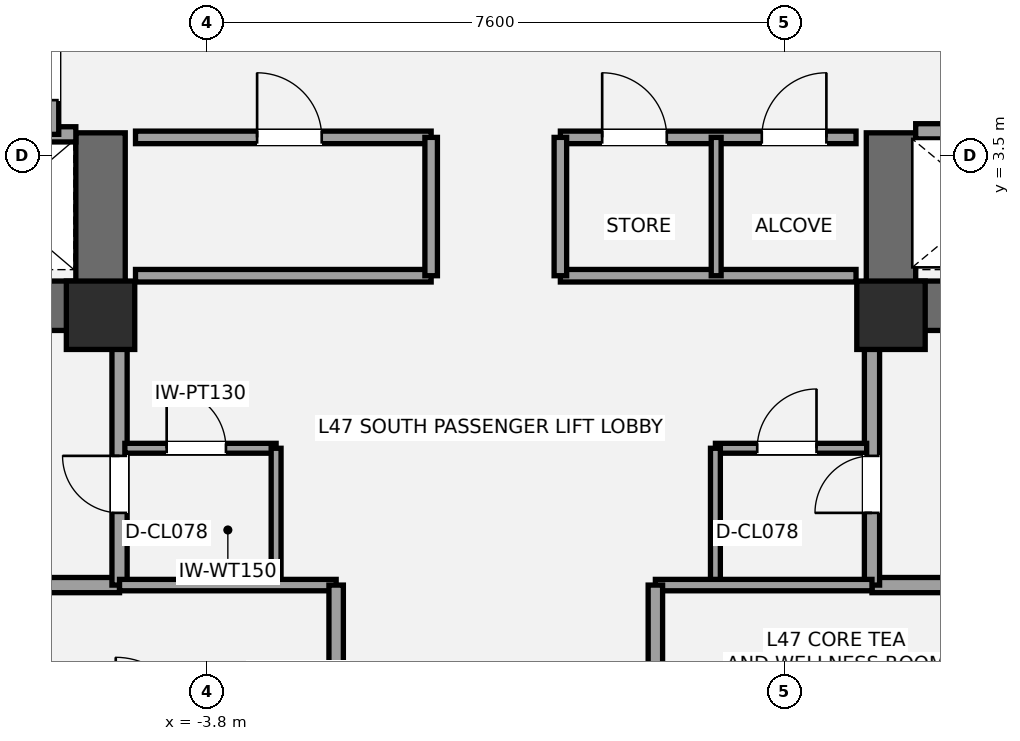
"""IFC4 building model, lengths in metres.
Left out: names, types, materials, properties, quantities, classifications, styles, units other than length and angle.
Written with IfcOpenShell. Run it as: python <this file> out.ifc"""

import sys

from ifc_helpers import new_model, si_unit, direction, frame, frame_2d, origin, origin_2d, place, context, subcontext, project, spatial, rectangle, extrude, element, fill, save


model = new_model("IFC4")
c1 = context("Model", 3, precision=1e-05, world=origin(), true_north=direction((0.0, 1.0)))
c2 = subcontext(c1, "Body", "Model", "MODEL_VIEW")
j1 = project(units=[si_unit("LENGTHUNIT", "METRE"), si_unit("PLANEANGLEUNIT", "RADIAN")], contexts=[c1])
p1 = place(None, origin())
s1 = spatial("IfcSite", under=j1, at=p1, CompositionType="ELEMENT")
p2 = place(p1, origin())
s2 = spatial("IfcBuilding", under=s1, at=p2, CompositionType="ELEMENT")
p3 = place(p2, frame((0.0, 0.0, 172.6)))
s3 = spatial("IfcBuildingStorey", under=s2, at=p3, CompositionType="ELEMENT", Elevation=172.6)
p4 = place(p3, frame((-4.875, 1.525, 0.0), z_axis=(0.0, 0.0, 1.0), x_axis=(-1.0, 0.0, 0.0)))
e1 = element("IfcWall", 1, at=p4, inside=s3, PredefinedType="SHEAR", context=c2, shape_type="SweptSolid", body=[
    extrude(rectangle(XDim=8.925, YDim=0.65, at=frame_2d((4.462, 0.0))), origin(), (0.0, 0.0, 1.0), 3.2),
])
p5 = place(p4, frame((5.425, 0.0, 0.0)))
e2 = element("IfcOpeningElement", 2, at=p5, cuts=e1, PredefinedType="OPENING", context=c2, shape_type="SweptSolid", body=[
    extrude(rectangle(XDim=1.05, YDim=2.15, at=frame_2d((0.525, 1.075))), frame((0.0, 0.335, 0.0), z_axis=(0.0, -1.0, 0.0), x_axis=(1.0, 0.0, 0.0)), (0.0, 0.0, 1.0), 0.67),
])
p6 = place(p4, frame((3.755, 0.0, 0.0)))
e3 = element("IfcOpeningElement", 3, at=p6, cuts=e1, PredefinedType="OPENING", context=c2, shape_type="SweptSolid", body=[
    extrude(rectangle(XDim=1.1, YDim=2.2, at=frame_2d((0.55, 1.1))), frame((0.0, 0.335, 0.0), z_axis=(0.0, -1.0, 0.0), x_axis=(1.0, 0.0, 0.0)), (0.0, 0.0, 1.0), 0.67),
])
p7 = place(p3, frame((-5.2, 1.2, 0.0), z_axis=(0.0, 0.0, 1.0), x_axis=(0.0, 1.0, 0.0)))
e4 = element("IfcWall", 4, at=p7, inside=s3, PredefinedType="SHEAR", context=c2, shape_type="SweptSolid", body=[
    extrude(rectangle(XDim=2.6, YDim=0.65, at=frame_2d((1.3, 0.0))), origin(), (0.0, 0.0, 1.0), 3.2),
])
p8 = place(p3, frame((13.8, 1.525, 0.0), z_axis=(0.0, 0.0, 1.0), x_axis=(-1.0, 0.0, 0.0)))
e5 = element("IfcWall", 5, at=p8, inside=s3, PredefinedType="SHEAR", context=c2, shape_type="SweptSolid", body=[
    extrude(rectangle(XDim=8.925, YDim=0.65, at=frame_2d((4.462, 0.0))), origin(), (0.0, 0.0, 1.0), 3.2),
])
p9 = place(p8, frame((2.45, 0.0, 0.0)))
e6 = element("IfcOpeningElement", 6, at=p9, cuts=e5, PredefinedType="OPENING", context=c2, shape_type="SweptSolid", body=[
    extrude(rectangle(XDim=1.05, YDim=2.15, at=frame_2d((0.525, 1.075))), frame((0.0, 0.335, 0.0), z_axis=(0.0, -1.0, 0.0), x_axis=(1.0, 0.0, 0.0)), (0.0, 0.0, 1.0), 0.67),
])
p10 = place(p8, frame((4.45, 0.0, 0.0)))
e7 = element("IfcOpeningElement", 7, at=p10, cuts=e5, PredefinedType="OPENING", context=c2, shape_type="SweptSolid", body=[
    extrude(rectangle(XDim=1.1, YDim=2.2, at=frame_2d((0.55, 1.1))), frame((0.0, 0.335, 0.0), z_axis=(0.0, -1.0, 0.0), x_axis=(1.0, 0.0, 0.0)), (0.0, 0.0, 1.0), 0.67),
])
p11 = place(p3, frame((5.2, 1.2, 0.0), z_axis=(0.0, 0.0, 1.0), x_axis=(0.0, 1.0, 0.0)))
e8 = element("IfcWall", 8, at=p11, inside=s3, PredefinedType="SHEAR", context=c2, shape_type="SweptSolid", body=[
    extrude(rectangle(XDim=2.6, YDim=0.65, at=frame_2d((1.3, 0.0))), origin(), (0.0, 0.0, 1.0), 3.2),
])
for number, where, z_axis, x_axis in (
    (9, (-5.2, 1.4, 0.0), (0.0, 0.0, 1.0), (1.0, 0.0, 0.0)),
    (10, (5.2, 1.4, 0.0), (0.0, 0.0, 1.0), (1.0, 0.0, 0.0)),
):
    element("IfcColumn", number, at=place(p3, frame(where, z_axis=z_axis, x_axis=x_axis)), inside=s3, PredefinedType="COLUMN", context=c2, shape_type="SweptSolid", body=[
        extrude(rectangle(XDim=0.9, YDim=0.9, at=origin_2d()), origin(), (0.0, 0.0, 1.0), 3.2),
    ])
p12 = place(p3, frame((-7.2, -2.15, 0.0), z_axis=(0.0, 0.0, 1.0), x_axis=(1.0, 0.0, 0.0)))
e11 = element("IfcWall", 11, at=p12, inside=s3, PredefinedType="SOLIDWALL", context=c2, shape_type="SweptSolid", body=[
    extrude(rectangle(XDim=2.25, YDim=0.2, at=frame_2d((1.125, 0.0))), origin(), (0.0, 0.0, 1.0), 3.02),
])
p13 = place(p3, frame((-4.95, -2.15, 0.0), z_axis=(0.0, 0.0, 1.0), x_axis=(0.0, 1.0, 0.0)))
e12 = element("IfcWall", 12, at=p13, inside=s3, PredefinedType="SOLIDWALL", context=c2, shape_type="SweptSolid", body=[
    extrude(rectangle(XDim=3.4, YDim=0.2, at=frame_2d((1.7, 0.0))), origin(), (0.0, 0.0, 1.0), 2.473),
])
p14 = place(p13, frame((0.95, 0.0, 0.0)))
e13 = element("IfcOpeningElement", 13, at=p14, cuts=e12, PredefinedType="OPENING", context=c2, shape_type="SweptSolid", body=[
    extrude(rectangle(XDim=0.75, YDim=2.1, at=frame_2d((0.375, 1.05))), frame((0.0, 0.11, 0.0), z_axis=(0.0, -1.0, 0.0), x_axis=(1.0, 0.0, 0.0)), (0.0, 0.0, 1.0), 0.22),
])
p15 = place(p3, frame((4.95, -2.15, 0.0), z_axis=(0.0, 0.0, 1.0), x_axis=(1.0, 0.0, 0.0)))
e14 = element("IfcWall", 14, at=p15, inside=s3, PredefinedType="SOLIDWALL", context=c2, shape_type="SweptSolid", body=[
    extrude(rectangle(XDim=2.25, YDim=0.2, at=frame_2d((1.125, 0.0))), origin(), (0.0, 0.0, 1.0), 3.02),
])
p16 = place(p3, frame((4.95, -2.15, 0.0), z_axis=(0.0, 0.0, 1.0), x_axis=(0.0, 1.0, 0.0)))
e15 = element("IfcWall", 15, at=p16, inside=s3, PredefinedType="SOLIDWALL", context=c2, shape_type="SweptSolid", body=[
    extrude(rectangle(XDim=3.4, YDim=0.2, at=frame_2d((1.7, 0.0))), origin(), (0.0, 0.0, 1.0), 2.473),
])
p17 = place(p16, frame((0.95, 0.0, 0.0)))
e16 = element("IfcOpeningElement", 16, at=p17, cuts=e15, PredefinedType="OPENING", context=c2, shape_type="SweptSolid", body=[
    extrude(rectangle(XDim=0.75, YDim=2.1, at=frame_2d((0.375, 1.05))), frame((0.0, 0.11, 0.0), z_axis=(0.0, -1.0, 0.0), x_axis=(1.0, 0.0, 0.0)), (0.0, 0.0, 1.0), 0.22),
])
p18 = place(p3, frame((-4.88, -0.35, 0.0), z_axis=(0.0, 0.0, 1.0), x_axis=(1.0, 0.0, 0.0)))
e17 = element("IfcWall", 17, at=p18, inside=s3, PredefinedType="PARTITIONING", context=c2, shape_type="SweptSolid", body=[
    extrude(rectangle(XDim=1.99, YDim=0.13, at=frame_2d((0.995, 0.0))), origin(), (0.0, 0.0, 1.0), 3.02),
])
p19 = place(p18, frame((0.55, 0.0, 0.0)))
e18 = element("IfcOpeningElement", 18, at=p19, cuts=e17, PredefinedType="OPENING", context=c2, shape_type="SweptSolid", body=[
    extrude(rectangle(XDim=0.78, YDim=2.1, at=frame_2d((0.39, 1.05))), frame((0.0, 0.075, 0.0), z_axis=(0.0, -1.0, 0.0), x_axis=(1.0, 0.0, 0.0)), (0.0, 0.0, 1.0), 0.15),
])
p20 = place(p3, frame((-2.89, -2.15, 0.0), z_axis=(0.0, 0.0, 1.0), x_axis=(0.0, 1.0, 0.0)))
e19 = element("IfcWall", 19, at=p20, inside=s3, PredefinedType="PARTITIONING", context=c2, shape_type="SweptSolid", body=[
    extrude(rectangle(XDim=1.8, YDim=0.13, at=frame_2d((0.9, 0.0))), origin(), (0.0, 0.0, 1.0), 3.02),
])
p21 = place(p3, frame((2.89, -0.35, 0.0), z_axis=(0.0, 0.0, 1.0), x_axis=(1.0, 0.0, 0.0)))
e20 = element("IfcWall", 20, at=p21, inside=s3, PredefinedType="PARTITIONING", context=c2, shape_type="SweptSolid", body=[
    extrude(rectangle(XDim=1.99, YDim=0.13, at=frame_2d((0.995, 0.0))), origin(), (0.0, 0.0, 1.0), 3.02),
])
p22 = place(p21, frame((0.55, 0.0, 0.0)))
e21 = element("IfcOpeningElement", 21, at=p22, cuts=e20, PredefinedType="OPENING", context=c2, shape_type="SweptSolid", body=[
    extrude(rectangle(XDim=0.78, YDim=2.1, at=frame_2d((0.39, 1.05))), frame((0.0, 0.075, 0.0), z_axis=(0.0, -1.0, 0.0), x_axis=(1.0, 0.0, 0.0)), (0.0, 0.0, 1.0), 0.15),
])
p23 = place(p3, frame((2.89, -2.15, 0.0), z_axis=(0.0, 0.0, 1.0), x_axis=(0.0, 1.0, 0.0)))
e22 = element("IfcWall", 22, at=p23, inside=s3, PredefinedType="PARTITIONING", context=c2, shape_type="SweptSolid", body=[
    extrude(rectangle(XDim=1.8, YDim=0.13, at=frame_2d((0.9, 0.0))), origin(), (0.0, 0.0, 1.0), 3.02),
])
p24 = place(p3, frame((-9.78, 3.78, 0.0), z_axis=(0.0, 0.0, 1.0), x_axis=(1.0, 0.0, 0.0)))
e23 = element("IfcWall", 23, at=p24, inside=s3, PredefinedType="SOLIDWALL", context=c2, shape_type="SweptSolid", body=[
    extrude(rectangle(XDim=4.255, YDim=0.2, at=frame_2d((2.127, 0.0))), origin(), (0.0, 0.0, 1.0), 3.02),
])
p25 = place(p3, frame((-5.85, 3.78, 0.0), z_axis=(0.0, 0.0, 1.0), x_axis=(0.0, 1.0, 0.0)))
e24 = element("IfcWall", 24, at=p25, inside=s3, PredefinedType="SOLIDWALL", context=c2, shape_type="SweptSolid", body=[
    extrude(rectangle(XDim=1.69, YDim=0.2, at=frame_2d((0.845, 0.0))), origin(), (0.0, 0.0, 1.0), 3.02),
])
p26 = place(p25, frame((0.45, 0.0, 0.0)))
e25 = element("IfcOpeningElement", 25, at=p26, cuts=e24, PredefinedType="OPENING", context=c2, shape_type="SweptSolid", body=[
    extrude(rectangle(XDim=0.75, YDim=2.1, at=frame_2d((0.375, 1.05))), frame((0.0, 0.11, 0.0), z_axis=(0.0, -1.0, 0.0), x_axis=(1.0, 0.0, 0.0)), (0.0, 0.0, 1.0), 0.22),
])
p27 = place(p3, frame((5.525, 3.82, 0.0), z_axis=(0.0, 0.0, 1.0), x_axis=(1.0, 0.0, 0.0)))
e26 = element("IfcWall", 26, at=p27, inside=s3, PredefinedType="SOLIDWALL", context=c2, shape_type="SweptSolid", body=[
    extrude(rectangle(XDim=4.255, YDim=0.2, at=frame_2d((2.127, 0.0))), origin(), (0.0, 0.0, 1.0), 3.02),
])
p28 = place(p27, frame((0.65, 0.0, 0.0)))
e27 = element("IfcOpeningElement", 27, at=p28, cuts=e26, PredefinedType="OPENING", context=c2, shape_type="SweptSolid", body=[
    extrude(rectangle(XDim=1.2, YDim=2.2, at=frame_2d((0.6, 1.1))), frame((0.0, 0.11, 0.0), z_axis=(0.0, -1.0, 0.0), x_axis=(1.0, 0.0, 0.0)), (0.0, 0.0, 1.0), 0.22),
])
p29 = place(p3, frame((-4.74, 1.92, 0.0), z_axis=(0.0, 0.0, 1.0), x_axis=(1.0, 0.0, 0.0)))
e28 = element("IfcWall", 28, at=p29, inside=s3, PredefinedType="PARTITIONING", context=c2, shape_type="SweptSolid", body=[
    extrude(rectangle(XDim=3.89, YDim=0.165, at=frame_2d((1.945, 0.0))), origin(), (0.0, 0.0, 1.0), 2.16),
])
p30 = place(p3, frame((-4.74, 3.74, 0.0), z_axis=(0.0, 0.0, 1.0), x_axis=(1.0, 0.0, 0.0)))
e29 = element("IfcWall", 29, at=p30, inside=s3, PredefinedType="PARTITIONING", context=c2, shape_type="SweptSolid", body=[
    extrude(rectangle(XDim=3.89, YDim=0.165, at=frame_2d((1.945, 0.0))), origin(), (0.0, 0.0, 1.0), 3.02),
])
p31 = place(p30, frame((1.6, 0.0, 0.0)))
e30 = element("IfcOpeningElement", 30, at=p31, cuts=e29, PredefinedType="OPENING", context=c2, shape_type="SweptSolid", body=[
    extrude(rectangle(XDim=0.85, YDim=2.1, at=frame_2d((0.425, 1.05))), frame((0.0, 0.093, 0.0), z_axis=(0.0, -1.0, 0.0), x_axis=(1.0, 0.0, 0.0)), (0.0, 0.0, 1.0), 0.185),
])
p32 = place(p3, frame((-0.85, 1.92, 0.0), z_axis=(0.0, 0.0, 1.0), x_axis=(0.0, 1.0, 0.0)))
e31 = element("IfcWall", 31, at=p32, inside=s3, PredefinedType="PARTITIONING", context=c2, shape_type="SweptSolid", body=[
    extrude(rectangle(XDim=1.82, YDim=0.165, at=frame_2d((0.91, 0.0))), origin(), (0.0, 0.0, 1.0), 3.02),
])
p33 = place(p3, frame((0.85, 1.92, 0.0), z_axis=(0.0, 0.0, 1.0), x_axis=(1.0, 0.0, 0.0)))
e32 = element("IfcWall", 32, at=p33, inside=s3, PredefinedType="PARTITIONING", context=c2, shape_type="SweptSolid", body=[
    extrude(rectangle(XDim=3.89, YDim=0.165, at=frame_2d((1.945, 0.0))), origin(), (0.0, 0.0, 1.0), 2.16),
])
p34 = place(p3, frame((0.85, 3.74, 0.0), z_axis=(0.0, 0.0, 1.0), x_axis=(1.0, 0.0, 0.0)))
e33 = element("IfcWall", 33, at=p34, inside=s3, PredefinedType="PARTITIONING", context=c2, shape_type="SweptSolid", body=[
    extrude(rectangle(XDim=3.89, YDim=0.165, at=frame_2d((1.945, 0.0))), origin(), (0.0, 0.0, 1.0), 3.02),
])
p35 = place(p34, frame((0.55, 0.0, 0.0)))
e34 = element("IfcOpeningElement", 34, at=p35, cuts=e33, PredefinedType="OPENING", context=c2, shape_type="SweptSolid", body=[
    extrude(rectangle(XDim=0.85, YDim=2.1, at=frame_2d((0.425, 1.05))), frame((0.0, 0.093, 0.0), z_axis=(0.0, -1.0, 0.0), x_axis=(1.0, 0.0, 0.0)), (0.0, 0.0, 1.0), 0.185),
])
p36 = place(p34, frame((2.65, 0.0, 0.0)))
e35 = element("IfcOpeningElement", 35, at=p36, cuts=e33, PredefinedType="OPENING", context=c2, shape_type="SweptSolid", body=[
    extrude(rectangle(XDim=0.85, YDim=2.1, at=frame_2d((0.425, 1.05))), frame((0.0, 0.093, 0.0), z_axis=(0.0, -1.0, 0.0), x_axis=(1.0, 0.0, 0.0)), (0.0, 0.0, 1.0), 0.185),
])
p37 = place(p3, frame((0.85, 1.92, 0.0), z_axis=(0.0, 0.0, 1.0), x_axis=(0.0, 1.0, 0.0)))
e36 = element("IfcWall", 36, at=p37, inside=s3, PredefinedType="PARTITIONING", context=c2, shape_type="SweptSolid", body=[
    extrude(rectangle(XDim=1.82, YDim=0.165, at=frame_2d((0.91, 0.0))), origin(), (0.0, 0.0, 1.0), 3.02),
])
p38 = place(p3, frame((2.9, 1.92, 0.0), z_axis=(0.0, 0.0, 1.0), x_axis=(0.0, 1.0, 0.0)))
e37 = element("IfcWall", 37, at=p38, inside=s3, PredefinedType="PARTITIONING", context=c2, shape_type="SweptSolid", body=[
    extrude(rectangle(XDim=1.82, YDim=0.13, at=frame_2d((0.91, 0.0))), origin(), (0.0, 0.0, 1.0), 3.02),
])
p39 = place(p3, frame((-4.95, -2.15, 0.0), z_axis=(0.0, 0.0, 1.0), x_axis=(1.0, 0.0, 0.0)))
e38 = element("IfcWall", 38, at=p39, inside=s3, PredefinedType="PLUMBINGWALL", context=c2, shape_type="SweptSolid", body=[
    extrude(rectangle(XDim=2.85, YDim=0.15, at=frame_2d((1.425, 0.0))), origin(), (0.0, 0.0, 1.0), 3.02),
])
p40 = place(p3, frame((-2.1, -4.05, 0.0), z_axis=(0.0, 0.0, 1.0), x_axis=(0.0, 1.0, 0.0)))
e39 = element("IfcWall", 39, at=p40, inside=s3, PredefinedType="PLUMBINGWALL", context=c2, shape_type="SweptSolid", body=[
    extrude(rectangle(XDim=1.9, YDim=0.19, at=frame_2d((0.95, 0.0))), origin(), (0.0, 0.0, 1.0), 3.02),
])
p41 = place(p3, frame((2.1, -2.15, 0.0), z_axis=(0.0, 0.0, 1.0), x_axis=(1.0, 0.0, 0.0)))
e40 = element("IfcWall", 40, at=p41, inside=s3, PredefinedType="PLUMBINGWALL", context=c2, shape_type="SweptSolid", body=[
    extrude(rectangle(XDim=2.85, YDim=0.15, at=frame_2d((1.425, 0.0))), origin(), (0.0, 0.0, 1.0), 3.02),
])
p42 = place(p3, frame((2.1, -4.05, 0.0), z_axis=(0.0, 0.0, 1.0), x_axis=(0.0, 1.0, 0.0)))
e41 = element("IfcWall", 41, at=p42, inside=s3, PredefinedType="PLUMBINGWALL", context=c2, shape_type="SweptSolid", body=[
    extrude(rectangle(XDim=1.9, YDim=0.19, at=frame_2d((0.95, 0.0))), origin(), (0.0, 0.0, 1.0), 3.02),
])
p43 = place(p14, origin())
e42 = element("IfcDoor", 42, at=p43, inside=s3, OperationType="SINGLE_SWING_RIGHT", PredefinedType="DOOR", context=c2, shape_type="SweptSolid", body=[
    extrude(rectangle(XDim=0.75, YDim=2.1, at=frame_2d((0.375, 1.05))), frame((0.0, 0.025, 0.0), z_axis=(0.0, -1.0, 0.0), x_axis=(1.0, 0.0, 0.0)), (0.0, 0.0, 1.0), 0.05),
])
fill(e13, e42)
p44 = place(p17, origin())
e43 = element("IfcDoor", 43, at=p44, inside=s3, OperationType="SINGLE_SWING_LEFT", PredefinedType="DOOR", context=c2, shape_type="SweptSolid", body=[
    extrude(rectangle(XDim=0.75, YDim=2.1, at=frame_2d((0.375, 1.05))), frame((0.0, 0.025, 0.0), z_axis=(0.0, -1.0, 0.0), x_axis=(1.0, 0.0, 0.0)), (0.0, 0.0, 1.0), 0.05),
])
fill(e16, e43)
p45 = place(p19, origin())
e44 = element("IfcDoor", 44, at=p45, inside=s3, OperationType="SINGLE_SWING_LEFT", PredefinedType="DOOR", context=c2, shape_type="SweptSolid", body=[
    extrude(rectangle(XDim=0.78, YDim=2.1, at=frame_2d((0.39, 1.05))), frame((0.0, 0.025, 0.0), z_axis=(0.0, -1.0, 0.0), x_axis=(1.0, 0.0, 0.0)), (0.0, 0.0, 1.0), 0.05),
])
fill(e18, e44)
p46 = place(p22, origin())
e45 = element("IfcDoor", 45, at=p46, inside=s3, OperationType="SINGLE_SWING_RIGHT", PredefinedType="DOOR", context=c2, shape_type="SweptSolid", body=[
    extrude(rectangle(XDim=0.78, YDim=2.1, at=frame_2d((0.39, 1.05))), frame((0.0, 0.025, 0.0), z_axis=(0.0, -1.0, 0.0), x_axis=(1.0, 0.0, 0.0)), (0.0, 0.0, 1.0), 0.05),
])
fill(e21, e45)
p47 = place(p26, origin())
e46 = element("IfcDoor", 46, at=p47, inside=s3, OperationType="SINGLE_SWING_RIGHT", PredefinedType="DOOR", context=c2, shape_type="SweptSolid", body=[
    extrude(rectangle(XDim=0.75, YDim=2.1, at=frame_2d((0.375, 1.05))), frame((0.0, 0.025, 0.0), z_axis=(0.0, -1.0, 0.0), x_axis=(1.0, 0.0, 0.0)), (0.0, 0.0, 1.0), 0.05),
])
fill(e25, e46)
p48 = place(p31, origin())
e47 = element("IfcDoor", 47, at=p48, inside=s3, OperationType="SINGLE_SWING_LEFT", PredefinedType="DOOR", context=c2, shape_type="SweptSolid", body=[
    extrude(rectangle(XDim=0.85, YDim=2.1, at=frame_2d((0.425, 1.05))), frame((0.0, 0.025, 0.0), z_axis=(0.0, -1.0, 0.0), x_axis=(1.0, 0.0, 0.0)), (0.0, 0.0, 1.0), 0.05),
])
fill(e30, e47)
p49 = place(p35, origin())
e48 = element("IfcDoor", 48, at=p49, inside=s3, OperationType="SINGLE_SWING_LEFT", PredefinedType="DOOR", context=c2, shape_type="SweptSolid", body=[
    extrude(rectangle(XDim=0.85, YDim=2.1, at=frame_2d((0.425, 1.05))), frame((0.0, 0.025, 0.0), z_axis=(0.0, -1.0, 0.0), x_axis=(1.0, 0.0, 0.0)), (0.0, 0.0, 1.0), 0.05),
])
fill(e34, e48)
p50 = place(p36, origin())
e49 = element("IfcDoor", 49, at=p50, inside=s3, OperationType="SINGLE_SWING_RIGHT", PredefinedType="DOOR", context=c2, shape_type="SweptSolid", body=[
    extrude(rectangle(XDim=0.85, YDim=2.1, at=frame_2d((0.425, 1.05))), frame((0.0, 0.025, 0.0), z_axis=(0.0, -1.0, 0.0), x_axis=(1.0, 0.0, 0.0)), (0.0, 0.0, 1.0), 0.05),
])
fill(e35, e49)
save(model, sys.argv[1])
